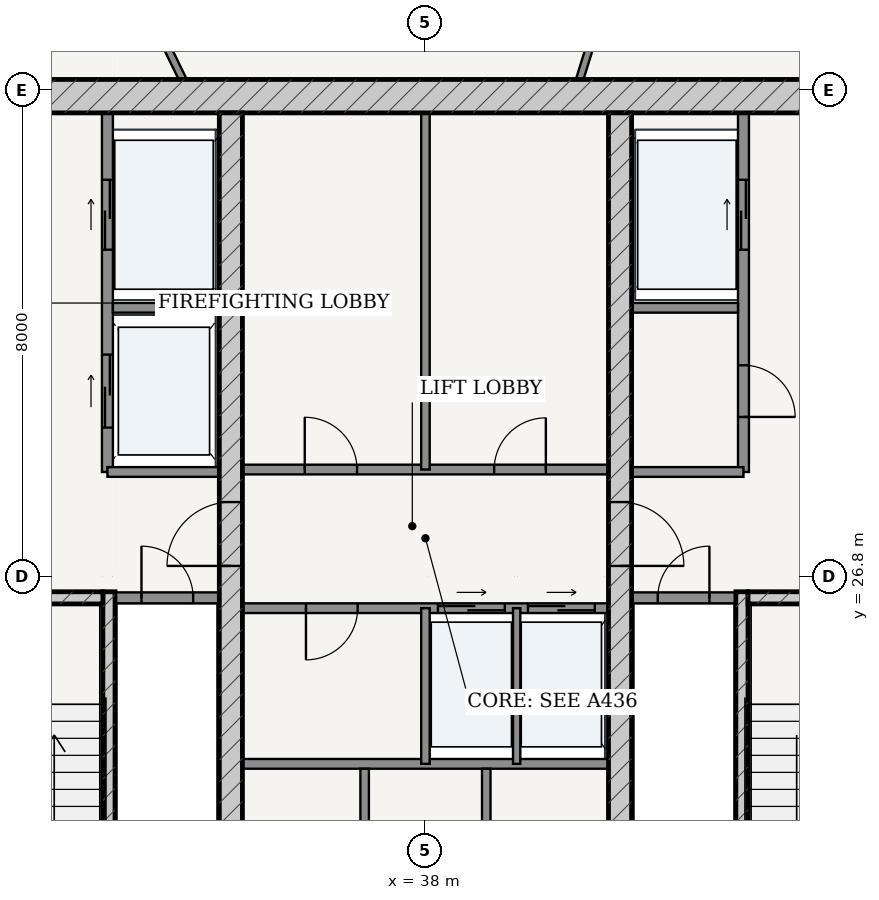
"""IFC4 building model, lengths in metres.
Left out: names, types, materials, properties, quantities, classifications, styles, units other than length and angle.
Written with IfcOpenShell. Run it as: python <this file> out.ifc"""

import sys

from ifc_helpers import new_model, si_unit, direction, frame, frame_2d, origin, place, context, subcontext, project, spatial, rectangle, extrude, source, transform, mapped, element, fill, save


model = new_model("IFC4")
c1 = context("Model", 3, precision=1e-05, world=origin(), true_north=direction((-0.2419218956, 0.970295726276)))
c2 = subcontext(c1, "Body", "Model", "MODEL_VIEW")
j1 = project(units=[si_unit("LENGTHUNIT", "METRE"), si_unit("PLANEANGLEUNIT", "RADIAN")], contexts=[c1])
p1 = place(None, origin())
s1 = spatial("IfcSite", under=j1, at=p1, CompositionType="ELEMENT")
p2 = place(p1, origin())
s2 = spatial("IfcBuilding", under=s1, at=p2, CompositionType="ELEMENT")
p3 = place(p2, frame((0.0, 0.0, 278.2)))
s3 = spatial("IfcBuildingStorey", under=s2, at=p3, CompositionType="ELEMENT", Elevation=278.2)
p4 = place(p3, frame((28.825, 34.7, 0.0), z_axis=(0.0, 0.0, 1.0), x_axis=(1.0, 0.0, 0.0)))
e1 = element("IfcWall", 1, at=p4, inside=s3, PredefinedType="SHEAR", context=c2, shape_type="SweptSolid", body=[
    extrude(rectangle(XDim=18.35, YDim=0.55, at=frame_2d((9.175, 0.0))), origin(), (0.0, 0.0, 1.0), 3.49),
])
p5 = place(p3, frame((32.795, 19.175, 0.0), z_axis=(0.0, 0.0, 1.0), x_axis=(0.0, 1.0, 0.0)))
e2 = element("IfcWall", 2, at=p5, inside=s3, PredefinedType="SOLIDWALL", context=c2, shape_type="SweptSolid", body=[
    extrude(rectangle(XDim=7.375, YDim=0.2, at=frame_2d((3.688, 0.0))), origin(), (0.0, 0.0, 1.0), 3.49),
])
p6 = place(p3, frame((29.375, 26.45, 0.0), z_axis=(0.0, 0.0, 1.0), x_axis=(1.0, 0.0, 0.0)))
e3 = element("IfcWall", 3, at=p6, inside=s3, PredefinedType="SOLIDWALL", context=c2, shape_type="SweptSolid", body=[
    extrude(rectangle(XDim=3.32, YDim=0.2, at=frame_2d((1.66, 0.0))), origin(), (0.0, 0.0, 1.0), 3.49),
])
p7 = place(p6, frame((1.185, 0.0, 0.0)))
e4 = element("IfcOpeningElement", 4, at=p7, cuts=e3, PredefinedType="OPENING", context=c2, shape_type="SweptSolid", body=[
    extrude(rectangle(XDim=0.95, YDim=2.15, at=frame_2d((0.475, 1.075))), frame((0.0, 0.11, 0.0), z_axis=(0.0, -1.0, 0.0), x_axis=(1.0, 0.0, 0.0)), (0.0, 0.0, 1.0), 0.22),
])
p8 = place(p3, frame((43.205, 19.175, 0.0), z_axis=(0.0, 0.0, 1.0), x_axis=(0.0, 1.0, 0.0)))
e5 = element("IfcWall", 5, at=p8, inside=s3, PredefinedType="SOLIDWALL", context=c2, shape_type="SweptSolid", body=[
    extrude(rectangle(XDim=7.375, YDim=0.2, at=frame_2d((3.688, 0.0))), origin(), (0.0, 0.0, 1.0), 3.49),
])
p9 = place(p3, frame((43.305, 26.45, 0.0), z_axis=(0.0, 0.0, 1.0), x_axis=(1.0, 0.0, 0.0)))
e6 = element("IfcWall", 6, at=p9, inside=s3, PredefinedType="SOLIDWALL", context=c2, shape_type="SweptSolid", body=[
    extrude(rectangle(XDim=3.32, YDim=0.2, at=frame_2d((1.66, 0.0))), origin(), (0.0, 0.0, 1.0), 3.49),
])
p10 = place(p9, frame((1.185, 0.0, 0.0)))
e7 = element("IfcOpeningElement", 7, at=p10, cuts=e6, PredefinedType="OPENING", context=c2, shape_type="SweptSolid", body=[
    extrude(rectangle(XDim=0.95, YDim=2.15, at=frame_2d((0.475, 1.075))), frame((0.0, 0.11, 0.0), z_axis=(0.0, -1.0, 0.0), x_axis=(1.0, 0.0, 0.0)), (0.0, 0.0, 1.0), 0.22),
])
p11 = place(p3, frame((34.8, 19.175, 0.0), z_axis=(0.0, 0.0, 1.0), x_axis=(0.0, 1.0, 0.0)))
e8 = element("IfcWall", 8, at=p11, inside=s3, PredefinedType="SHEAR", context=c2, shape_type="SweptSolid", body=[
    extrude(rectangle(XDim=15.25, YDim=0.38, at=frame_2d((7.625, 0.0))), origin(), (0.0, 0.0, 1.0), 3.49),
])
p12 = place(p11, frame((7.8, 0.0, 0.0)))
e9 = element("IfcOpeningElement", 9, at=p12, cuts=e8, PredefinedType="OPENING", context=c2, shape_type="SweptSolid", body=[
    extrude(rectangle(XDim=1.05, YDim=2.15, at=frame_2d((0.525, 1.075))), frame((0.0, 0.2, 0.0), z_axis=(0.0, -1.0, 0.0), x_axis=(1.0, 0.0, 0.0)), (0.0, 0.0, 1.0), 0.4),
])
p13 = place(p3, frame((41.2, 19.175, 0.0), z_axis=(0.0, 0.0, 1.0), x_axis=(0.0, 1.0, 0.0)))
e10 = element("IfcWall", 10, at=p13, inside=s3, PredefinedType="SHEAR", context=c2, shape_type="SweptSolid", body=[
    extrude(rectangle(XDim=15.25, YDim=0.38, at=frame_2d((7.625, 0.0))), origin(), (0.0, 0.0, 1.0), 3.49),
])
p14 = place(p13, frame((7.8, 0.0, 0.0)))
e11 = element("IfcOpeningElement", 11, at=p14, cuts=e10, PredefinedType="OPENING", context=c2, shape_type="SweptSolid", body=[
    extrude(rectangle(XDim=1.05, YDim=2.15, at=frame_2d((0.525, 1.075))), frame((0.0, 0.2, 0.0), z_axis=(0.0, -1.0, 0.0), x_axis=(1.0, 0.0, 0.0)), (0.0, 0.0, 1.0), 0.4),
])
p15 = place(p3, frame((32.9, 26.45, 0.0), z_axis=(0.0, 0.0, 1.0), x_axis=(1.0, 0.0, 0.0)))
e12 = element("IfcWall", 12, at=p15, inside=s3, PredefinedType="PARTITIONING", context=c2, shape_type="SweptSolid", body=[
    extrude(rectangle(XDim=1.71, YDim=0.18, at=frame_2d((0.855, 0.0))), origin(), (0.0, 0.0, 1.0), 3.49),
])
p16 = place(p15, frame((0.43, 0.0, 0.0)))
e13 = element("IfcOpeningElement", 13, at=p16, cuts=e12, PredefinedType="OPENING", context=c2, shape_type="SweptSolid", body=[
    extrude(rectangle(XDim=0.85, YDim=2.1, at=frame_2d((0.425, 1.05))), frame((0.0, 0.1, 0.0), z_axis=(0.0, -1.0, 0.0), x_axis=(1.0, 0.0, 0.0)), (0.0, 0.0, 1.0), 0.2),
])
p17 = place(p3, frame((41.39, 26.45, 0.0), z_axis=(0.0, 0.0, 1.0), x_axis=(1.0, 0.0, 0.0)))
e14 = element("IfcWall", 14, at=p17, inside=s3, PredefinedType="PARTITIONING", context=c2, shape_type="SweptSolid", body=[
    extrude(rectangle(XDim=1.71, YDim=0.18, at=frame_2d((0.855, 0.0))), origin(), (0.0, 0.0, 1.0), 3.49),
])
p18 = place(p17, frame((0.43, 0.0, 0.0)))
e15 = element("IfcOpeningElement", 15, at=p18, cuts=e14, PredefinedType="OPENING", context=c2, shape_type="SweptSolid", body=[
    extrude(rectangle(XDim=0.85, YDim=2.1, at=frame_2d((0.425, 1.05))), frame((0.0, 0.1, 0.0), z_axis=(0.0, -1.0, 0.0), x_axis=(1.0, 0.0, 0.0)), (0.0, 0.0, 1.0), 0.2),
])
p19 = place(p3, frame((32.77, 28.52, 0.0), z_axis=(0.0, 0.0, 1.0), x_axis=(0.0, 1.0, 0.0)))
e16 = element("IfcWall", 16, at=p19, inside=s3, PredefinedType="PARTITIONING", context=c2, shape_type="SweptSolid", body=[
    extrude(rectangle(XDim=5.905, YDim=0.18, at=frame_2d((2.953, 0.0))), origin(), (0.0, 0.0, 1.0), 3.49),
])
p20 = place(p19, frame((3.655, 0.0, 0.0)))
e17 = element("IfcOpeningElement", 17, at=p20, cuts=e16, PredefinedType="OPENING", context=c2, shape_type="SweptSolid", body=[
    extrude(rectangle(XDim=1.15, YDim=2.2, at=frame_2d((0.575, 1.1))), frame((0.0, 0.1, 0.0), z_axis=(0.0, -1.0, 0.0), x_axis=(1.0, 0.0, 0.0)), (0.0, 0.0, 1.0), 0.2),
])
p21 = place(p19, frame((0.73, 0.0, 0.0)))
e18 = element("IfcOpeningElement", 18, at=p21, cuts=e16, PredefinedType="OPENING", context=c2, shape_type="SweptSolid", body=[
    extrude(rectangle(XDim=1.2, YDim=2.25, at=frame_2d((0.6, 1.125))), frame((0.0, 0.1, 0.0), z_axis=(0.0, -1.0, 0.0), x_axis=(1.0, 0.0, 0.0)), (0.0, 0.0, 1.0), 0.2),
])
p22 = place(p3, frame((32.86, 31.22, 0.0), z_axis=(0.0, 0.0, 1.0), x_axis=(1.0, 0.0, 0.0)))
e19 = element("IfcWall", 19, at=p22, inside=s3, PredefinedType="PARTITIONING", context=c2, shape_type="SweptSolid", body=[
    extrude(rectangle(XDim=1.75, YDim=0.16, at=frame_2d((0.875, 0.0))), origin(), (0.0, 0.0, 1.0), 3.49),
])
p23 = place(p3, frame((32.77, 28.52, 0.0), z_axis=(0.0, 0.0, 1.0), x_axis=(1.0, 0.0, 0.0)))
e20 = element("IfcWall", 20, at=p23, inside=s3, PredefinedType="PARTITIONING", context=c2, shape_type="SweptSolid", body=[
    extrude(rectangle(XDim=1.84, YDim=0.16, at=frame_2d((0.92, 0.0))), origin(), (0.0, 0.0, 1.0), 3.49),
])
p24 = place(p3, frame((43.23, 28.52, 0.0), z_axis=(0.0, 0.0, 1.0), x_axis=(0.0, 1.0, 0.0)))
e21 = element("IfcWall", 21, at=p24, inside=s3, PredefinedType="PARTITIONING", context=c2, shape_type="SweptSolid", body=[
    extrude(rectangle(XDim=5.905, YDim=0.18, at=frame_2d((2.953, 0.0))), origin(), (0.0, 0.0, 1.0), 3.49),
])
p25 = place(p24, frame((0.905, 0.0, 0.0)))
e22 = element("IfcOpeningElement", 22, at=p25, cuts=e21, PredefinedType="OPENING", context=c2, shape_type="SweptSolid", body=[
    extrude(rectangle(XDim=0.85, YDim=2.1, at=frame_2d((0.425, 1.05))), frame((0.0, 0.1, 0.0), z_axis=(0.0, -1.0, 0.0), x_axis=(1.0, 0.0, 0.0)), (0.0, 0.0, 1.0), 0.2),
])
p26 = place(p24, frame((3.655, 0.0, 0.0)))
e23 = element("IfcOpeningElement", 23, at=p26, cuts=e21, PredefinedType="OPENING", context=c2, shape_type="SweptSolid", body=[
    extrude(rectangle(XDim=1.15, YDim=2.2, at=frame_2d((0.575, 1.1))), frame((0.0, 0.1, 0.0), z_axis=(0.0, -1.0, 0.0), x_axis=(1.0, 0.0, 0.0)), (0.0, 0.0, 1.0), 0.2),
])
p27 = place(p3, frame((41.39, 31.22, 0.0), z_axis=(0.0, 0.0, 1.0), x_axis=(1.0, 0.0, 0.0)))
e24 = element("IfcWall", 24, at=p27, inside=s3, PredefinedType="PARTITIONING", context=c2, shape_type="SweptSolid", body=[
    extrude(rectangle(XDim=1.75, YDim=0.16, at=frame_2d((0.875, 0.0))), origin(), (0.0, 0.0, 1.0), 3.49),
])
p28 = place(p3, frame((41.39, 28.52, 0.0), z_axis=(0.0, 0.0, 1.0), x_axis=(1.0, 0.0, 0.0)))
e25 = element("IfcWall", 25, at=p28, inside=s3, PredefinedType="PARTITIONING", context=c2, shape_type="SweptSolid", body=[
    extrude(rectangle(XDim=1.84, YDim=0.16, at=frame_2d((0.92, 0.0))), origin(), (0.0, 0.0, 1.0), 3.49),
])
p29 = place(p3, frame((34.99, 28.56, 0.0), z_axis=(0.0, 0.0, 1.0), x_axis=(1.0, 0.0, 0.0)))
e26 = element("IfcWall", 26, at=p29, inside=s3, PredefinedType="PARTITIONING", context=c2, shape_type="SweptSolid", body=[
    extrude(rectangle(XDim=6.02, YDim=0.16, at=frame_2d((3.01, 0.0))), origin(), (0.0, 0.0, 1.0), 3.49),
])
p30 = place(p29, frame((1.025, 0.0, 0.0)))
e27 = element("IfcOpeningElement", 27, at=p30, cuts=e26, PredefinedType="OPENING", context=c2, shape_type="SweptSolid", body=[
    extrude(rectangle(XDim=0.86, YDim=2.1, at=frame_2d((0.43, 1.05))), frame((0.0, 0.09, 0.0), z_axis=(0.0, -1.0, 0.0), x_axis=(1.0, 0.0, 0.0)), (0.0, 0.0, 1.0), 0.18),
])
p31 = place(p29, frame((4.14, 0.0, 0.0)))
e28 = element("IfcOpeningElement", 28, at=p31, cuts=e26, PredefinedType="OPENING", context=c2, shape_type="SweptSolid", body=[
    extrude(rectangle(XDim=0.85, YDim=2.1, at=frame_2d((0.425, 1.05))), frame((0.0, 0.09, 0.0), z_axis=(0.0, -1.0, 0.0), x_axis=(1.0, 0.0, 0.0)), (0.0, 0.0, 1.0), 0.18),
])
p32 = place(p3, frame((38.0, 28.56, 0.0), z_axis=(0.0, 0.0, 1.0), x_axis=(0.0, 1.0, 0.0)))
e29 = element("IfcWall", 29, at=p32, inside=s3, PredefinedType="PARTITIONING", context=c2, shape_type="SweptSolid", body=[
    extrude(rectangle(XDim=5.865, YDim=0.14, at=frame_2d((2.933, 0.0))), origin(), (0.0, 0.0, 1.0), 3.49),
])
p33 = place(p3, frame((34.99, 26.28, 0.0), z_axis=(0.0, 0.0, 1.0), x_axis=(1.0, 0.0, 0.0)))
e30 = element("IfcWall", 30, at=p33, inside=s3, PredefinedType="PARTITIONING", context=c2, shape_type="SweptSolid", body=[
    extrude(rectangle(XDim=6.02, YDim=0.16, at=frame_2d((3.01, 0.0))), origin(), (0.0, 0.0, 1.0), 3.49),
])
p34 = place(p33, frame((1.045, 0.0, 0.0)))
e31 = element("IfcOpeningElement", 31, at=p34, cuts=e30, PredefinedType="OPENING", context=c2, shape_type="SweptSolid", body=[
    extrude(rectangle(XDim=0.85, YDim=2.1, at=frame_2d((0.425, 1.05))), frame((0.0, 0.09, 0.0), z_axis=(0.0, -1.0, 0.0), x_axis=(1.0, 0.0, 0.0)), (0.0, 0.0, 1.0), 0.18),
])
p35 = place(p33, frame((3.215, 0.0, 0.0)))
e32 = element("IfcOpeningElement", 32, at=p35, cuts=e30, PredefinedType="OPENING", context=c2, shape_type="SweptSolid", body=[
    extrude(rectangle(XDim=1.1, YDim=2.2, at=frame_2d((0.55, 1.1))), frame((0.0, 0.09, 0.0), z_axis=(0.0, -1.0, 0.0), x_axis=(1.0, 0.0, 0.0)), (0.0, 0.0, 1.0), 0.18),
])
p36 = place(p33, frame((4.695, 0.0, 0.0)))
e33 = element("IfcOpeningElement", 33, at=p36, cuts=e30, PredefinedType="OPENING", context=c2, shape_type="SweptSolid", body=[
    extrude(rectangle(XDim=1.1, YDim=2.2, at=frame_2d((0.55, 1.1))), frame((0.0, 0.09, 0.0), z_axis=(0.0, -1.0, 0.0), x_axis=(1.0, 0.0, 0.0)), (0.0, 0.0, 1.0), 0.18),
])
p37 = place(p3, frame((34.99, 23.72, 0.0), z_axis=(0.0, 0.0, 1.0), x_axis=(1.0, 0.0, 0.0)))
e34 = element("IfcWall", 34, at=p37, inside=s3, PredefinedType="PARTITIONING", context=c2, shape_type="SweptSolid", body=[
    extrude(rectangle(XDim=6.02, YDim=0.16, at=frame_2d((3.01, 0.0))), origin(), (0.0, 0.0, 1.0), 3.49),
])
p38 = place(p3, frame((38.0, 23.72, 0.0), z_axis=(0.0, 0.0, 1.0), x_axis=(0.0, 1.0, 0.0)))
e35 = element("IfcWall", 35, at=p38, inside=s3, PredefinedType="PARTITIONING", context=c2, shape_type="SweptSolid", body=[
    extrude(rectangle(XDim=2.56, YDim=0.14, at=frame_2d((1.28, 0.0))), origin(), (0.0, 0.0, 1.0), 3.49),
])
p39 = place(p3, frame((39.5, 23.72, 0.0), z_axis=(0.0, 0.0, 1.0), x_axis=(0.0, 1.0, 0.0)))
e36 = element("IfcWall", 36, at=p39, inside=s3, PredefinedType="PARTITIONING", context=c2, shape_type="SweptSolid", body=[
    extrude(rectangle(XDim=2.56, YDim=0.12, at=frame_2d((1.28, 0.0))), origin(), (0.0, 0.0, 1.0), 3.49),
])
p40 = place(p3, frame((37.0, 19.175, 0.0), z_axis=(0.0, 0.0, 1.0), x_axis=(0.0, 1.0, 0.0)))
e37 = element("IfcWall", 37, at=p40, inside=s3, PredefinedType="PARTITIONING", context=c2, shape_type="SweptSolid", body=[
    extrude(rectangle(XDim=4.465, YDim=0.14, at=frame_2d((2.232, 0.0))), origin(), (0.0, 0.0, 1.0), 3.49),
])
p41 = place(p40, frame((1.808, 0.0, 0.0)))
e38 = element("IfcOpeningElement", 38, at=p41, cuts=e37, PredefinedType="OPENING", context=c2, shape_type="SweptSolid", body=[
    extrude(rectangle(XDim=0.85, YDim=2.1, at=frame_2d((0.425, 1.05))), frame((0.0, 0.08, 0.0), z_axis=(0.0, -1.0, 0.0), x_axis=(1.0, 0.0, 0.0)), (0.0, 0.0, 1.0), 0.16),
])
p42 = place(p3, frame((39.0, 19.175, 0.0), z_axis=(0.0, 0.0, 1.0), x_axis=(0.0, 1.0, 0.0)))
e39 = element("IfcWall", 39, at=p42, inside=s3, PredefinedType="PARTITIONING", context=c2, shape_type="SweptSolid", body=[
    extrude(rectangle(XDim=4.465, YDim=0.14, at=frame_2d((2.232, 0.0))), origin(), (0.0, 0.0, 1.0), 3.49),
])
p43 = place(p42, frame((1.808, 0.0, 0.0)))
e40 = element("IfcOpeningElement", 40, at=p43, cuts=e39, PredefinedType="OPENING", context=c2, shape_type="SweptSolid", body=[
    extrude(rectangle(XDim=0.85, YDim=2.1, at=frame_2d((0.425, 1.05))), frame((0.0, 0.08, 0.0), z_axis=(0.0, -1.0, 0.0), x_axis=(1.0, 0.0, 0.0)), (0.0, 0.0, 1.0), 0.16),
])
p44 = place(p3, frame((40.537, 34.977, 0.0), z_axis=(0.0, 0.0, 1.0), x_axis=(0.29633127961, 0.95508521752, 0.0)))
e41 = element("IfcWall", 41, at=p44, inside=s3, PredefinedType="PARTITIONING", context=c2, shape_type="SweptSolid", body=[
    extrude(rectangle(XDim=2.826, YDim=0.12, at=frame_2d((1.413, 0.0))), origin(), (0.0, 0.0, 1.0), 2.575),
])
p45 = place(p44, frame((0.963, 0.0, 0.0)))
e42 = element("IfcOpeningElement", 42, at=p45, cuts=e41, PredefinedType="OPENING", context=c2, shape_type="SweptSolid", body=[
    extrude(rectangle(XDim=0.9, YDim=2.15, at=frame_2d((0.45, 1.075))), frame((0.0, 0.07, 0.0), z_axis=(0.0, -1.0, 0.0), x_axis=(1.0, 0.0, 0.0)), (0.0, 0.0, 1.0), 0.14),
])
p46 = place(p3, frame((34.008, 34.977, 0.0), z_axis=(0.0, 0.0, 1.0), x_axis=(-0.438717914863, 0.898624833386, 0.0)))
e43 = element("IfcWall", 43, at=p46, inside=s3, PredefinedType="PARTITIONING", context=c2, shape_type="SweptSolid", body=[
    extrude(rectangle(XDim=3.007, YDim=0.12, at=frame_2d((1.504, 0.0))), origin(), (0.0, 0.0, 1.0), 3.49),
])
p47 = place(p46, frame((1.054, 0.0, 0.0)))
e44 = element("IfcOpeningElement", 44, at=p47, cuts=e43, PredefinedType="OPENING", context=c2, shape_type="SweptSolid", body=[
    extrude(rectangle(XDim=0.9, YDim=2.15, at=frame_2d((0.45, 1.075))), frame((0.0, 0.07, 0.0), z_axis=(0.0, -1.0, 0.0), x_axis=(1.0, 0.0, 0.0)), (0.0, 0.0, 1.0), 0.14),
])
m1 = source(origin(), c2, "Body", "SweptSolid", [
    extrude(rectangle(XDim=1.05, YDim=2.15, at=frame_2d((0.525, 1.075))), frame((0.0, 0.025, 0.0), z_axis=(0.0, -1.0, 0.0), x_axis=(1.0, 0.0, 0.0)), (0.0, 0.0, 1.0), 0.05),
])
p48 = place(p12, origin())
e45 = element("IfcDoor", 45, at=p48, inside=s3, OperationType="SINGLE_SWING_LEFT", PredefinedType="DOOR", context=c2, shape_type="MappedRepresentation", body=[
    mapped(m1, transform((0.0, 0.0, 0.0), scale=1.0)),
])
fill(e9, e45)
p49 = place(p14, frame((1.05, 0.0, 0.0), z_axis=(0.0, 0.0, 1.0), x_axis=(-1.0, 0.0, 0.0)))
e46 = element("IfcDoor", 46, at=p49, inside=s3, OperationType="SINGLE_SWING_RIGHT", PredefinedType="DOOR", context=c2, shape_type="MappedRepresentation", body=[
    mapped(m1, transform((0.0, 0.0, 0.0), scale=1.0)),
])
fill(e11, e46)
m2 = source(origin(), c2, "Body", "SweptSolid", [
    extrude(rectangle(XDim=0.85, YDim=2.1, at=frame_2d((0.425, 1.05))), frame((0.0, 0.025, 0.0), z_axis=(0.0, -1.0, 0.0), x_axis=(1.0, 0.0, 0.0)), (0.0, 0.0, 1.0), 0.05),
])
p50 = place(p16, origin())
e47 = element("IfcDoor", 47, at=p50, inside=s3, OperationType="SINGLE_SWING_LEFT", PredefinedType="DOOR", context=c2, shape_type="MappedRepresentation", body=[
    mapped(m2, transform((0.0, 0.0, 0.0), scale=1.0)),
])
fill(e13, e47)
p51 = place(p18, origin())
e48 = element("IfcDoor", 48, at=p51, inside=s3, OperationType="SINGLE_SWING_RIGHT", PredefinedType="DOOR", context=c2, shape_type="MappedRepresentation", body=[
    mapped(m2, transform((0.0, 0.0, 0.0), scale=1.0)),
])
fill(e15, e48)
p52 = place(p25, frame((0.85, 0.0, 0.0), z_axis=(0.0, 0.0, 1.0), x_axis=(-1.0, 0.0, 0.0)))
e49 = element("IfcDoor", 49, at=p52, inside=s3, OperationType="SINGLE_SWING_RIGHT", PredefinedType="DOOR", context=c2, shape_type="MappedRepresentation", body=[
    mapped(m2, transform((0.0, 0.0, 0.0), scale=1.0)),
])
fill(e22, e49)
m3 = source(origin(), c2, "Body", "SweptSolid", [
    extrude(rectangle(XDim=0.86, YDim=2.1, at=frame_2d((0.43, 1.05))), frame((0.0, 0.025, 0.0), z_axis=(0.0, -1.0, 0.0), x_axis=(1.0, 0.0, 0.0)), (0.0, 0.0, 1.0), 0.05),
])
p53 = place(p30, origin())
e50 = element("IfcDoor", 50, at=p53, inside=s3, OperationType="SINGLE_SWING_LEFT", PredefinedType="DOOR", context=c2, shape_type="MappedRepresentation", body=[
    mapped(m3, transform((0.0, 0.0, 0.0), scale=1.0)),
])
fill(e27, e50)
p54 = place(p31, origin())
e51 = element("IfcDoor", 51, at=p54, inside=s3, OperationType="SINGLE_SWING_RIGHT", PredefinedType="DOOR", context=c2, shape_type="MappedRepresentation", body=[
    mapped(m2, transform((0.0, 0.0, 0.0), scale=1.0)),
])
fill(e28, e51)
p55 = place(p34, frame((0.85, 0.0, 0.0), z_axis=(0.0, 0.0, 1.0), x_axis=(-1.0, 0.0, 0.0)))
e52 = element("IfcDoor", 52, at=p55, inside=s3, OperationType="SINGLE_SWING_RIGHT", PredefinedType="DOOR", context=c2, shape_type="MappedRepresentation", body=[
    mapped(m2, transform((0.0, 0.0, 0.0), scale=1.0)),
])
fill(e31, e52)
m4 = source(origin(), c2, "Body", "SweptSolid", [
    extrude(rectangle(XDim=1.15, YDim=2.2, at=frame_2d((0.575, 1.1))), frame((0.0, 0.025, 0.0), z_axis=(0.0, -1.0, 0.0), x_axis=(1.0, 0.0, 0.0)), (0.0, 0.0, 1.0), 0.05),
])
p56 = place(p20, origin())
e53 = element("IfcDoor", 53, at=p56, inside=s3, OperationType="DOUBLE_DOOR_SLIDING", PredefinedType="DOOR", context=c2, shape_type="MappedRepresentation", body=[
    mapped(m4, transform((0.0, 0.0, 0.0), scale=1.0)),
])
fill(e17, e53)
p57 = place(p26, origin())
e54 = element("IfcDoor", 54, at=p57, inside=s3, OperationType="DOUBLE_DOOR_SLIDING", PredefinedType="DOOR", context=c2, shape_type="MappedRepresentation", body=[
    mapped(m4, transform((0.0, 0.0, 0.0), scale=1.0)),
])
fill(e23, e54)
m5 = source(origin(), c2, "Body", "SweptSolid", [
    extrude(rectangle(XDim=1.2, YDim=2.25, at=frame_2d((0.6, 1.125))), frame((0.0, 0.025, 0.0), z_axis=(0.0, -1.0, 0.0), x_axis=(1.0, 0.0, 0.0)), (0.0, 0.0, 1.0), 0.05),
])
p58 = place(p21, origin())
e55 = element("IfcDoor", 55, at=p58, inside=s3, OperationType="DOUBLE_DOOR_SLIDING", PredefinedType="DOOR", context=c2, shape_type="MappedRepresentation", body=[
    mapped(m5, transform((0.0, 0.0, 0.0), scale=1.0)),
])
fill(e18, e55)
m6 = source(origin(), c2, "Body", "SweptSolid", [
    extrude(rectangle(XDim=1.1, YDim=2.2, at=frame_2d((0.55, 1.1))), frame((0.0, 0.025, 0.0), z_axis=(0.0, -1.0, 0.0), x_axis=(1.0, 0.0, 0.0)), (0.0, 0.0, 1.0), 0.05),
])
p59 = place(p35, origin())
e56 = element("IfcDoor", 56, at=p59, inside=s3, OperationType="DOUBLE_DOOR_SLIDING", PredefinedType="DOOR", context=c2, shape_type="MappedRepresentation", body=[
    mapped(m6, transform((0.0, 0.0, 0.0), scale=1.0)),
])
fill(e32, e56)
p60 = place(p36, origin())
e57 = element("IfcDoor", 57, at=p60, inside=s3, OperationType="DOUBLE_DOOR_SLIDING", PredefinedType="DOOR", context=c2, shape_type="MappedRepresentation", body=[
    mapped(m6, transform((0.0, 0.0, 0.0), scale=1.0)),
])
fill(e33, e57)
save(model, sys.argv[1])
